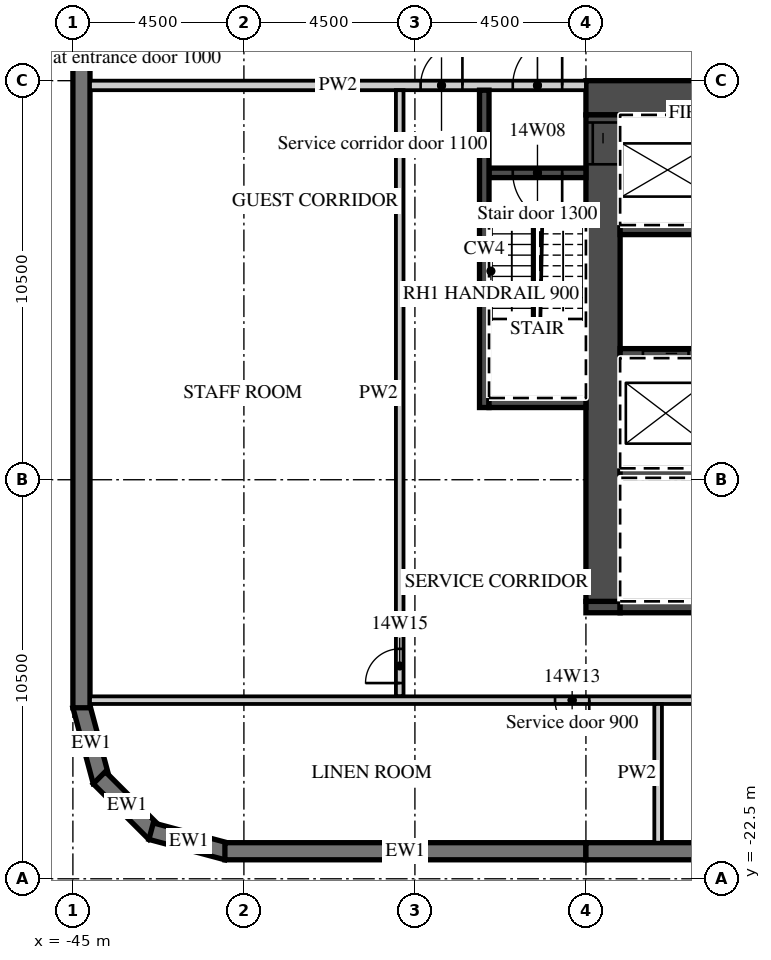
"""IFC4 building model, lengths in metres.
Left out: names, types, materials, properties, quantities, classifications, styles, units other than length and angle.
Written with IfcOpenShell. Run it as: python <this file> out.ifc"""

import sys

from ifc_helpers import new_model, si_unit, direction, frame, frame_2d, origin, place, context, subcontext, project, spatial, polyline, rectangle, outline, extrude, element, fill, save


model = new_model("IFC4")
c1 = context("Model", 3, precision=1e-05, world=origin(), true_north=direction((0.0, 1.0)))
c2 = subcontext(c1, "Body", "Model", "MODEL_VIEW")
j1 = project(units=[si_unit("LENGTHUNIT", "METRE"), si_unit("PLANEANGLEUNIT", "RADIAN")], contexts=[c1])
p1 = place(None, origin())
s1 = spatial("IfcSite", under=j1, at=p1, CompositionType="ELEMENT")
p2 = place(p1, origin())
s2 = spatial("IfcBuilding", under=s1, at=p2, CompositionType="ELEMENT")
p3 = place(p2, frame((0.0, 0.0, 76.5)))
s3 = spatial("IfcBuildingStorey", under=s2, at=p3, CompositionType="ELEMENT", Elevation=76.5)
p4 = place(p3, frame((-44.783, -17.942, 0.0), z_axis=(0.0, 0.0, 1.0), x_axis=(0.25881466832, -0.965926999034, 0.0)))
e1 = element("IfcWall", 1, at=p4, inside=s3, PredefinedType="SOLIDWALL", context=c2, shape_type="SweptSolid", body=[
    extrude(outline(polyline([(0.0, -0.225), (2.071, -0.225), (1.95, 0.225), (0.121, 0.225), (0.0, -0.225)])), origin(), (0.0, 0.0, 1.0), 3.02),
])
p5 = place(p3, frame((-44.305, -19.841, 0.0), z_axis=(0.0, 0.0, 1.0), x_axis=(0.707106781187, -0.707106781187, 0.0)))
e2 = element("IfcWall", 2, at=p5, inside=s3, PredefinedType="SOLIDWALL", context=c2, shape_type="SweptSolid", body=[
    extrude(outline(polyline([(0.0, -0.225), (2.071, -0.225), (1.95, 0.225), (0.121, 0.225), (0.0, -0.225)])), origin(), (0.0, 0.0, 1.0), 3.02),
])
p6 = place(p3, frame((-42.942, -21.247, 0.0), z_axis=(0.0, 0.0, 1.0), x_axis=(0.965926999034, -0.25881466832, 0.0)))
e3 = element("IfcWall", 3, at=p6, inside=s3, PredefinedType="SOLIDWALL", context=c2, shape_type="SweptSolid", body=[
    extrude(outline(polyline([(-0.0, -0.225), (2.07, -0.225), (1.95, 0.225), (0.12, 0.225), (-0.0, -0.225)])), origin(), (0.0, 0.0, 1.0), 3.02),
])
p7 = place(p3, frame((-41.0, -21.775, 0.0), z_axis=(0.0, 0.0, 1.0), x_axis=(1.0, 0.0, 0.0)))
e4 = element("IfcWall", 4, at=p7, inside=s3, PredefinedType="SOLIDWALL", context=c2, shape_type="SweptSolid", body=[
    extrude(rectangle(XDim=9.5, YDim=0.45, at=frame_2d((4.75, 0.0))), origin(), (0.0, 0.0, 1.0), 3.02),
])
p8 = place(p3, frame((-31.5, -21.775, 0.0), z_axis=(0.0, 0.0, 1.0), x_axis=(1.0, 0.0, 0.0)))
e5 = element("IfcWall", 5, at=p8, inside=s3, PredefinedType="SOLIDWALL", context=c2, shape_type="SweptSolid", body=[
    extrude(rectangle(XDim=18.0, YDim=0.45, at=frame_2d((9.0, 0.0))), origin(), (0.0, 0.0, 1.0), 3.02),
])
p9 = place(p3, frame((-44.775, 18.0, 0.0), z_axis=(0.0, 0.0, 1.0), x_axis=(0.0, -1.0, 0.0)))
e6 = element("IfcWall", 6, at=p9, inside=s3, PredefinedType="SOLIDWALL", context=c2, shape_type="SweptSolid", body=[
    extrude(rectangle(XDim=36.0, YDim=0.45, at=frame_2d((18.0, 0.0))), origin(), (0.0, 0.0, 1.0), 3.02),
])
p10 = place(p9, frame((3.9, 0.0, 0.45)))
e7 = element("IfcOpeningElement", 7, at=p10, cuts=e6, PredefinedType="OPENING", context=c2, shape_type="SweptSolid", body=[
    extrude(rectangle(XDim=3.3, YDim=2.25, at=frame_2d((1.65, 1.125))), frame((0.0, 0.235, 0.0), z_axis=(0.0, -1.0, 0.0), x_axis=(1.0, 0.0, 0.0)), (0.0, 0.0, 1.0), 0.47),
])
p11 = place(p9, frame((8.4, 0.0, 0.45)))
e8 = element("IfcOpeningElement", 8, at=p11, cuts=e6, PredefinedType="OPENING", context=c2, shape_type="SweptSolid", body=[
    extrude(rectangle(XDim=3.3, YDim=2.25, at=frame_2d((1.65, 1.125))), frame((0.0, 0.235, 0.0), z_axis=(0.0, -1.0, 0.0), x_axis=(1.0, 0.0, 0.0)), (0.0, 0.0, 1.0), 0.47),
])
p12 = place(p9, frame((12.9, 0.0, 0.45)))
e9 = element("IfcOpeningElement", 9, at=p12, cuts=e6, PredefinedType="OPENING", context=c2, shape_type="SweptSolid", body=[
    extrude(rectangle(XDim=3.3, YDim=2.25, at=frame_2d((1.65, 1.125))), frame((0.0, 0.235, 0.0), z_axis=(0.0, -1.0, 0.0), x_axis=(1.0, 0.0, 0.0)), (0.0, 0.0, 1.0), 0.47),
])
p13 = place(p3, frame((-31.5, -1.95, 0.0), z_axis=(0.0, 0.0, 1.0), x_axis=(1.0, 0.0, 0.0)))
e10 = element("IfcWall", 10, at=p13, inside=s3, PredefinedType="SHEAR", context=c2, shape_type="SweptSolid", body=[
    extrude(rectangle(XDim=18.0, YDim=0.9, at=frame_2d((9.0, 0.0))), origin(), (0.0, 0.0, 1.0), 3.02),
])
p14 = place(p13, frame((14.725, 0.0, 0.0)))
e11 = element("IfcOpeningElement", 11, at=p14, cuts=e10, PredefinedType="OPENING", context=c2, shape_type="SweptSolid", body=[
    extrude(rectangle(XDim=1.8, YDim=2.1, at=frame_2d((0.9, 1.05))), frame((0.0, 0.46, 0.0), z_axis=(0.0, -1.0, 0.0), x_axis=(1.0, 0.0, 0.0)), (0.0, 0.0, 1.0), 0.92),
])
p15 = place(p3, frame((-31.5, -15.35, 0.0), z_axis=(0.0, 0.0, 1.0), x_axis=(1.0, 0.0, 0.0)))
e12 = element("IfcWall", 12, at=p15, inside=s3, PredefinedType="SHEAR", context=c2, shape_type="SweptSolid", body=[
    extrude(rectangle(XDim=0.9, YDim=0.3, at=frame_2d((0.45, 0.0))), origin(), (0.0, 0.0, 1.0), 3.02),
])
p16 = place(p3, frame((-30.6, -15.35, 0.0), z_axis=(0.0, 0.0, 1.0), x_axis=(1.0, 0.0, 0.0)))
e13 = element("IfcWall", 13, at=p16, inside=s3, PredefinedType="SHEAR", context=c2, shape_type="SweptSolid", body=[
    extrude(rectangle(XDim=10.3, YDim=0.3, at=frame_2d((5.15, 0.0))), origin(), (0.0, 0.0, 1.0), 3.02),
])
p17 = place(p16, frame((5.0, 0.0, 0.0)))
e14 = element("IfcOpeningElement", 14, at=p17, cuts=e13, PredefinedType="OPENING", context=c2, shape_type="SweptSolid", body=[
    extrude(rectangle(XDim=1.3, YDim=2.1, at=frame_2d((0.65, 1.05))), frame((0.0, 0.16, 0.0), z_axis=(0.0, -1.0, 0.0), x_axis=(1.0, 0.0, 0.0)), (0.0, 0.0, 1.0), 0.32),
])
p18 = place(p16, frame((7.312, 0.0, 0.0)))
e15 = element("IfcOpeningElement", 15, at=p18, cuts=e13, PredefinedType="OPENING", context=c2, shape_type="SweptSolid", body=[
    extrude(rectangle(XDim=0.9, YDim=2.1, at=frame_2d((0.45, 1.05))), frame((0.0, 0.16, 0.0), z_axis=(0.0, -1.0, 0.0), x_axis=(1.0, 0.0, 0.0)), (0.0, 0.0, 1.0), 0.32),
])
p19 = place(p3, frame((-31.05, -15.2, 0.0), z_axis=(0.0, 0.0, 1.0), x_axis=(0.0, 1.0, 0.0)))
e16 = element("IfcWall", 16, at=p19, inside=s3, PredefinedType="SHEAR", context=c2, shape_type="SweptSolid", body=[
    extrude(rectangle(XDim=12.8, YDim=0.9, at=frame_2d((6.4, 0.0))), origin(), (0.0, 0.0, 1.0), 3.02),
])
p20 = place(p19, frame((11.5, 0.0, 0.0)))
e17 = element("IfcOpeningElement", 17, at=p20, cuts=e16, PredefinedType="OPENING", context=c2, shape_type="SweptSolid", body=[
    extrude(rectangle(XDim=1.1, YDim=2.1, at=frame_2d((0.55, 1.05))), frame((0.0, 0.46, 0.0), z_axis=(0.0, -1.0, 0.0), x_axis=(1.0, 0.0, 0.0)), (0.0, 0.0, 1.0), 0.92),
])
p21 = place(p3, frame((-30.6, -5.425, 0.0), z_axis=(0.0, 0.0, 1.0), x_axis=(1.0, 0.0, 0.0)))
e18 = element("IfcWall", 18, at=p21, inside=s3, PredefinedType="SHEAR", context=c2, shape_type="SweptSolid", body=[
    extrude(rectangle(XDim=13.0, YDim=0.25, at=frame_2d((6.5, 0.0))), origin(), (0.0, 0.0, 1.0), 3.02),
])
p22 = place(p3, frame((-30.6, -8.675, 0.0), z_axis=(0.0, 0.0, 1.0), x_axis=(1.0, 0.0, 0.0)))
e19 = element("IfcWall", 19, at=p22, inside=s3, PredefinedType="SHEAR", context=c2, shape_type="SweptSolid", body=[
    extrude(rectangle(XDim=16.2, YDim=0.25, at=frame_2d((8.1, 0.0))), origin(), (0.0, 0.0, 1.0), 3.02),
])
p23 = place(p22, frame((0.6, 0.0, 0.0)))
e20 = element("IfcOpeningElement", 20, at=p23, cuts=e19, PredefinedType="OPENING", context=c2, shape_type="SweptSolid", body=[
    extrude(rectangle(XDim=1.2, YDim=2.1, at=frame_2d((0.6, 1.05))), frame((0.0, 0.135, 0.0), z_axis=(0.0, -1.0, 0.0), x_axis=(1.0, 0.0, 0.0)), (0.0, 0.0, 1.0), 0.27),
])
p24 = place(p22, frame((3.25, 0.0, 0.0)))
e21 = element("IfcOpeningElement", 21, at=p24, cuts=e19, PredefinedType="OPENING", context=c2, shape_type="SweptSolid", body=[
    extrude(rectangle(XDim=1.2, YDim=2.1, at=frame_2d((0.6, 1.05))), frame((0.0, 0.135, 0.0), z_axis=(0.0, -1.0, 0.0), x_axis=(1.0, 0.0, 0.0)), (0.0, 0.0, 1.0), 0.27),
])
p25 = place(p22, frame((5.9, 0.0, 0.0)))
e22 = element("IfcOpeningElement", 22, at=p25, cuts=e19, PredefinedType="OPENING", context=c2, shape_type="SweptSolid", body=[
    extrude(rectangle(XDim=1.2, YDim=2.1, at=frame_2d((0.6, 1.05))), frame((0.0, 0.135, 0.0), z_axis=(0.0, -1.0, 0.0), x_axis=(1.0, 0.0, 0.0)), (0.0, 0.0, 1.0), 0.27),
])
p26 = place(p22, frame((14.25, 0.0, 0.0)))
e23 = element("IfcOpeningElement", 23, at=p26, cuts=e19, PredefinedType="OPENING", context=c2, shape_type="SweptSolid", body=[
    extrude(rectangle(XDim=1.3, YDim=2.1, at=frame_2d((0.65, 1.05))), frame((0.0, 0.135, 0.0), z_axis=(0.0, -1.0, 0.0), x_axis=(1.0, 0.0, 0.0)), (0.0, 0.0, 1.0), 0.27),
])
p27 = place(p3, frame((-30.6, -11.825, 0.0), z_axis=(0.0, 0.0, 1.0), x_axis=(1.0, 0.0, 0.0)))
e24 = element("IfcWall", 24, at=p27, inside=s3, PredefinedType="SHEAR", context=c2, shape_type="SweptSolid", body=[
    extrude(rectangle(XDim=13.25, YDim=0.25, at=frame_2d((6.625, 0.0))), origin(), (0.0, 0.0, 1.0), 3.02),
])
p28 = place(p3, frame((-44.55, -1.625, 0.0), z_axis=(0.0, 0.0, 1.0), x_axis=(1.0, 0.0, 0.0)))
e25 = element("IfcWall", 25, at=p28, inside=s3, PredefinedType="PARTITIONING", context=c2, shape_type="SweptSolid", body=[
    extrude(rectangle(XDim=13.05, YDim=0.25, at=frame_2d((6.525, 0.0))), origin(), (0.0, 0.0, 1.0), 3.02),
])
p29 = place(p28, frame((11.125, 0.0, 0.0)))
e26 = element("IfcOpeningElement", 26, at=p29, cuts=e25, PredefinedType="OPENING", context=c2, shape_type="SweptSolid", body=[
    extrude(rectangle(XDim=1.3, YDim=2.1, at=frame_2d((0.65, 1.05))), frame((0.0, 0.135, 0.0), z_axis=(0.0, -1.0, 0.0), x_axis=(1.0, 0.0, 0.0)), (0.0, 0.0, 1.0), 0.27),
])
p30 = place(p28, frame((8.7, 0.0, 0.0)))
e27 = element("IfcOpeningElement", 27, at=p30, cuts=e25, PredefinedType="OPENING", context=c2, shape_type="SweptSolid", body=[
    extrude(rectangle(XDim=1.1, YDim=2.1, at=frame_2d((0.55, 1.05))), frame((0.0, 0.135, 0.0), z_axis=(0.0, -1.0, 0.0), x_axis=(1.0, 0.0, 0.0)), (0.0, 0.0, 1.0), 0.27),
])
p31 = place(p3, frame((-34.05, -3.925, 0.0), z_axis=(0.0, 0.0, 1.0), x_axis=(1.0, 0.0, 0.0)))
e28 = element("IfcWall", 28, at=p31, inside=s3, PredefinedType="SHEAR", context=c2, shape_type="SweptSolid", body=[
    extrude(rectangle(XDim=2.55, YDim=0.25, at=frame_2d((1.275, 0.0))), origin(), (0.0, 0.0, 1.0), 3.02),
])
p32 = place(p31, frame((0.625, 0.0, 0.0)))
e29 = element("IfcOpeningElement", 29, at=p32, cuts=e28, PredefinedType="OPENING", context=c2, shape_type="SweptSolid", body=[
    extrude(rectangle(XDim=1.3, YDim=2.1, at=frame_2d((0.65, 1.05))), frame((0.0, 0.135, 0.0), z_axis=(0.0, -1.0, 0.0), x_axis=(1.0, 0.0, 0.0)), (0.0, 0.0, 1.0), 0.27),
])
p33 = place(p3, frame((-34.175, -10.1, 0.0), z_axis=(0.0, 0.0, 1.0), x_axis=(0.0, 1.0, 0.0)))
e30 = element("IfcWall", 30, at=p33, inside=s3, PredefinedType="SHEAR", context=c2, shape_type="SweptSolid", body=[
    extrude(rectangle(XDim=8.35, YDim=0.25, at=frame_2d((4.175, 0.0))), origin(), (0.0, 0.0, 1.0), 3.02),
])
p34 = place(p3, frame((-34.05, -9.975, 0.0), z_axis=(0.0, 0.0, 1.0), x_axis=(1.0, 0.0, 0.0)))
e31 = element("IfcWall", 31, at=p34, inside=s3, PredefinedType="SHEAR", context=c2, shape_type="SweptSolid", body=[
    extrude(rectangle(XDim=2.55, YDim=0.25, at=frame_2d((1.275, 0.0))), origin(), (0.0, 0.0, 1.0), 3.02),
])
p35 = place(p3, frame((-36.4, -17.7, 0.0), z_axis=(0.0, 0.0, 1.0), x_axis=(0.0, 1.0, 0.0)))
e32 = element("IfcWall", 32, at=p35, inside=s3, PredefinedType="PARTITIONING", context=c2, shape_type="SweptSolid", body=[
    extrude(rectangle(XDim=15.95, YDim=0.2, at=frame_2d((7.975, 0.0))), origin(), (0.0, 0.0, 1.0), 3.02),
])
p36 = place(p35, frame((0.35, 0.0, 0.0)))
e33 = element("IfcOpeningElement", 33, at=p36, cuts=e32, PredefinedType="OPENING", context=c2, shape_type="SweptSolid", body=[
    extrude(rectangle(XDim=0.9, YDim=2.1, at=frame_2d((0.45, 1.05))), frame((0.0, 0.11, 0.0), z_axis=(0.0, -1.0, 0.0), x_axis=(1.0, 0.0, 0.0)), (0.0, 0.0, 1.0), 0.22),
])
p37 = place(p3, frame((-44.55, -17.8, 0.0), z_axis=(0.0, 0.0, 1.0), x_axis=(1.0, 0.0, 0.0)))
e34 = element("IfcWall", 34, at=p37, inside=s3, PredefinedType="PARTITIONING", context=c2, shape_type="SweptSolid", body=[
    extrude(rectangle(XDim=30.95, YDim=0.2, at=frame_2d((15.475, 0.0))), origin(), (0.0, 0.0, 1.0), 3.02),
])
p38 = place(p37, frame((12.238, 0.0, 0.0)))
e35 = element("IfcOpeningElement", 35, at=p38, cuts=e34, PredefinedType="OPENING", context=c2, shape_type="SweptSolid", body=[
    extrude(rectangle(XDim=0.9, YDim=2.1, at=frame_2d((0.45, 1.05))), frame((0.0, 0.11, 0.0), z_axis=(0.0, -1.0, 0.0), x_axis=(1.0, 0.0, 0.0)), (0.0, 0.0, 1.0), 0.22),
])
p39 = place(p37, frame((20.538, 0.0, 0.0)))
e36 = element("IfcOpeningElement", 36, at=p39, cuts=e34, PredefinedType="OPENING", context=c2, shape_type="SweptSolid", body=[
    extrude(rectangle(XDim=0.9, YDim=2.1, at=frame_2d((0.45, 1.05))), frame((0.0, 0.11, 0.0), z_axis=(0.0, -1.0, 0.0), x_axis=(1.0, 0.0, 0.0)), (0.0, 0.0, 1.0), 0.22),
])
p40 = place(p3, frame((-29.6, -21.55, 0.0), z_axis=(0.0, 0.0, 1.0), x_axis=(0.0, 1.0, 0.0)))
e37 = element("IfcWall", 37, at=p40, inside=s3, PredefinedType="PARTITIONING", context=c2, shape_type="SweptSolid", body=[
    extrude(rectangle(XDim=3.65, YDim=0.2, at=frame_2d((1.825, 0.0))), origin(), (0.0, 0.0, 1.0), 3.02),
])
p41 = place(p23, origin())
e38 = element("IfcDoor", 38, at=p41, inside=s3, OperationType="SLIDING_TO_LEFT", PredefinedType="DOOR", context=c2, shape_type="SweptSolid", body=[
    extrude(rectangle(XDim=1.2, YDim=2.1, at=frame_2d((0.6, 1.05))), frame((0.0, 0.025, 0.0), z_axis=(0.0, -1.0, 0.0), x_axis=(1.0, 0.0, 0.0)), (0.0, 0.0, 1.0), 0.05),
])
fill(e20, e38)
p42 = place(p20, origin())
e39 = element("IfcDoor", 39, at=p42, inside=s3, OperationType="SLIDING_TO_RIGHT", PredefinedType="DOOR", context=c2, shape_type="SweptSolid", body=[
    extrude(rectangle(XDim=1.1, YDim=2.1, at=frame_2d((0.55, 1.05))), frame((0.0, 0.025, 0.0), z_axis=(0.0, -1.0, 0.0), x_axis=(1.0, 0.0, 0.0)), (0.0, 0.0, 1.0), 0.05),
])
fill(e17, e39)
p43 = place(p29, origin())
e40 = element("IfcDoor", 40, at=p43, inside=s3, OperationType="SINGLE_SWING_RIGHT", PredefinedType="DOOR", context=c2, shape_type="SweptSolid", body=[
    extrude(rectangle(XDim=1.3, YDim=2.1, at=frame_2d((0.65, 1.05))), frame((0.0, 0.025, 0.0), z_axis=(0.0, -1.0, 0.0), x_axis=(1.0, 0.0, 0.0)), (0.0, 0.0, 1.0), 0.05),
])
fill(e26, e40)
p44 = place(p32, origin())
e41 = element("IfcDoor", 41, at=p44, inside=s3, OperationType="SINGLE_SWING_RIGHT", PredefinedType="DOOR", context=c2, shape_type="SweptSolid", body=[
    extrude(rectangle(XDim=1.3, YDim=2.1, at=frame_2d((0.65, 1.05))), frame((0.0, 0.025, 0.0), z_axis=(0.0, -1.0, 0.0), x_axis=(1.0, 0.0, 0.0)), (0.0, 0.0, 1.0), 0.05),
])
fill(e29, e41)
p45 = place(p30, origin())
e42 = element("IfcDoor", 42, at=p45, inside=s3, OperationType="SINGLE_SWING_RIGHT", PredefinedType="DOOR", context=c2, shape_type="SweptSolid", body=[
    extrude(rectangle(XDim=1.1, YDim=2.1, at=frame_2d((0.55, 1.05))), frame((0.0, 0.025, 0.0), z_axis=(0.0, -1.0, 0.0), x_axis=(1.0, 0.0, 0.0)), (0.0, 0.0, 1.0), 0.05),
])
fill(e27, e42)
p46 = place(p38, origin())
e43 = element("IfcDoor", 43, at=p46, inside=s3, OperationType="SINGLE_SWING_RIGHT", PredefinedType="DOOR", context=c2, shape_type="SweptSolid", body=[
    extrude(rectangle(XDim=0.9, YDim=2.1, at=frame_2d((0.45, 1.05))), frame((0.0, 0.025, 0.0), z_axis=(0.0, -1.0, 0.0), x_axis=(1.0, 0.0, 0.0)), (0.0, 0.0, 1.0), 0.05),
])
fill(e35, e43)
p47 = place(p36, origin())
e44 = element("IfcDoor", 44, at=p47, inside=s3, OperationType="SINGLE_SWING_LEFT", PredefinedType="DOOR", context=c2, shape_type="SweptSolid", body=[
    extrude(rectangle(XDim=0.9, YDim=2.1, at=frame_2d((0.45, 1.05))), frame((0.0, 0.025, 0.0), z_axis=(0.0, -1.0, 0.0), x_axis=(1.0, 0.0, 0.0)), (0.0, 0.0, 1.0), 0.05),
])
fill(e33, e44)
save(model, sys.argv[1])
